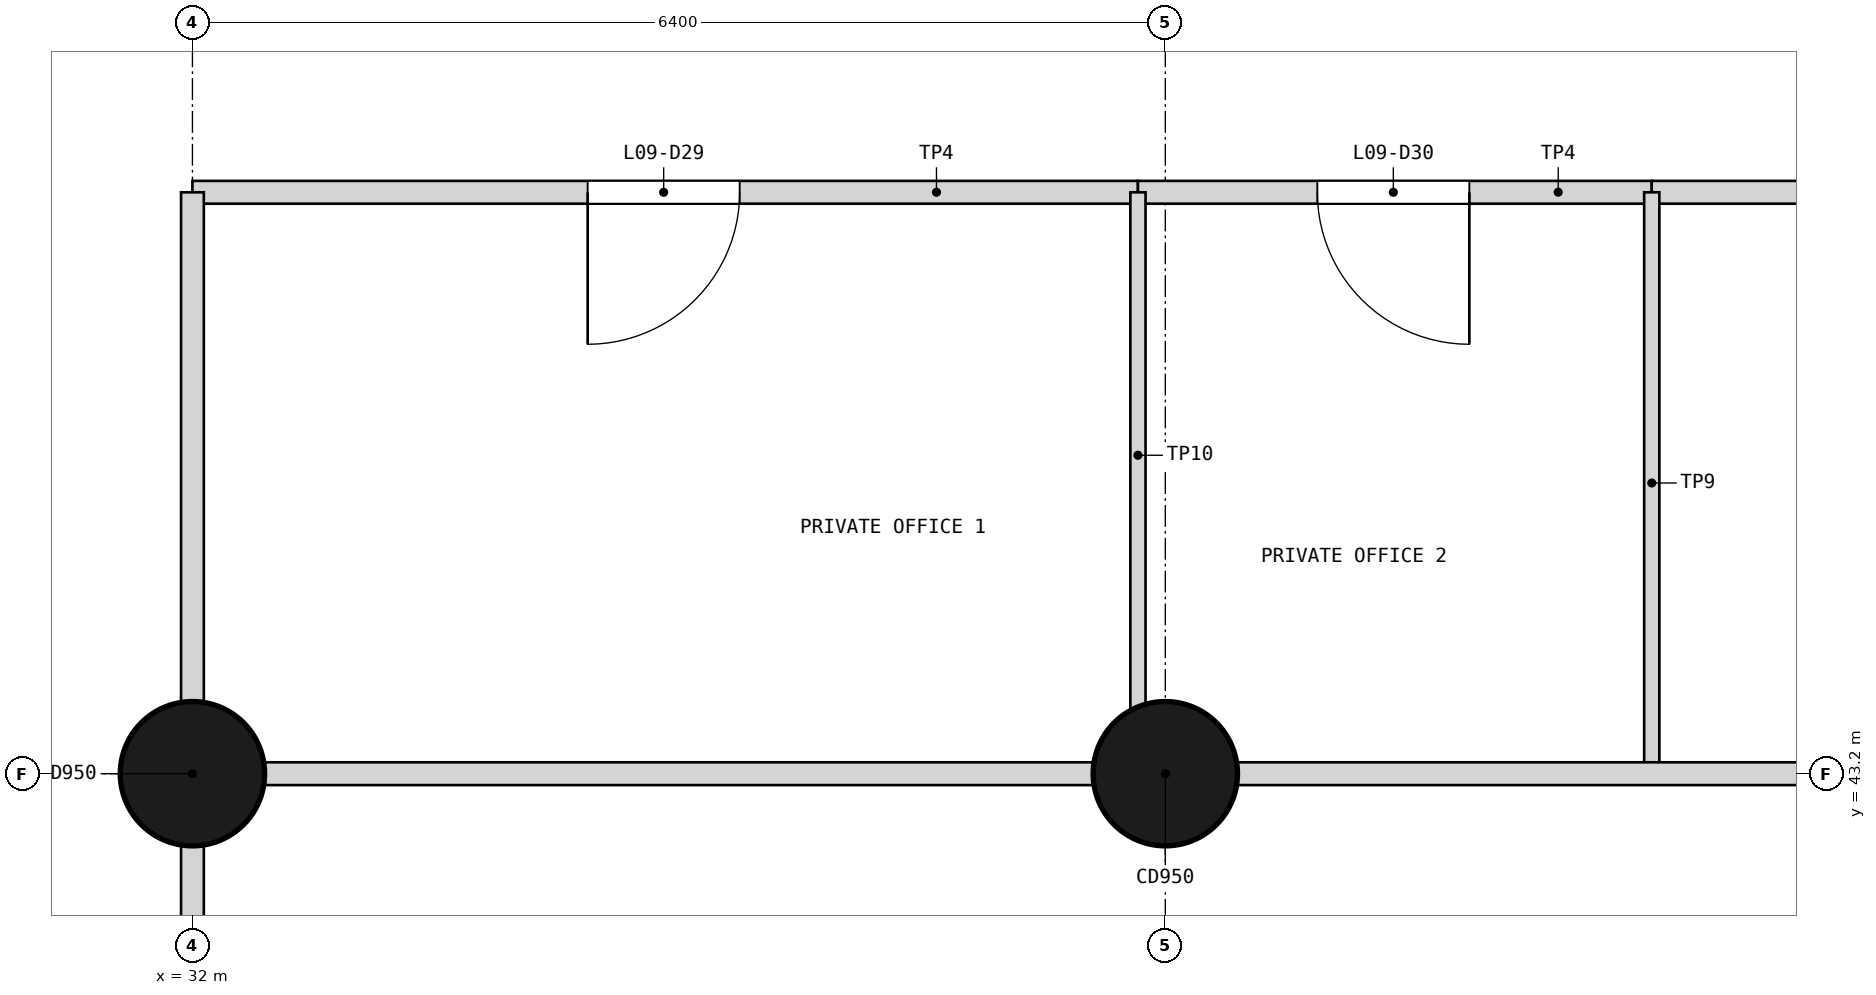
"""IFC4 building model, lengths in metres.
Left out: names, types, materials, properties, quantities, classifications, styles, units other than length and angle.
Written with IfcOpenShell. Run it as: python <this file> out.ifc"""

import sys

from ifc_helpers import new_model, si_unit, direction, frame, frame_2d, origin, origin_2d, place, context, subcontext, project, spatial, rectangle, circle, extrude, element, fill, save


model = new_model("IFC4")
c1 = context("Model", 3, precision=1e-05, world=origin(), true_north=direction((0.0, 1.0)))
c2 = subcontext(c1, "Body", "Model", "MODEL_VIEW")
j1 = project(units=[si_unit("LENGTHUNIT", "METRE"), si_unit("PLANEANGLEUNIT", "RADIAN")], contexts=[c1])
p1 = place(None, origin())
s1 = spatial("IfcSite", under=j1, at=p1, CompositionType="ELEMENT")
p2 = place(p1, origin())
s2 = spatial("IfcBuilding", under=s1, at=p2, CompositionType="ELEMENT")
p3 = place(p2, frame((0.0, 0.0, 36.6)))
s3 = spatial("IfcBuildingStorey", under=s2, at=p3, CompositionType="ELEMENT", Elevation=36.6)
for number, where, z_axis, x_axis in (
    (1, (32.0, 43.2, 0.0), (0.0, 0.0, 1.0), (1.0, 0.0, 0.0)),
    (2, (38.4, 43.2, 0.0), (0.0, 0.0, 1.0), (1.0, 0.0, 0.0)),
):
    element("IfcColumn", number, at=place(p3, frame(where, z_axis=z_axis, x_axis=x_axis)), inside=s3, PredefinedType="COLUMN", context=c2, shape_type="SweptSolid", body=[
        extrude(circle(Radius=0.475, at=origin_2d()), origin(), (0.0, 0.0, 1.0), 3.9),
    ])
p4 = place(p3, frame((32.0, 47.025, 0.0), z_axis=(0.0, 0.0, 1.0), x_axis=(1.0, 0.0, 0.0)))
e3 = element("IfcWall", 3, at=p4, inside=s3, PredefinedType="PARTITIONING", context=c2, shape_type="SweptSolid", body=[
    extrude(rectangle(XDim=6.22, YDim=0.15, at=frame_2d((3.11, 0.0))), origin(), (0.0, 0.0, 1.0), 3.68),
])
p5 = place(p4, frame((2.6, 0.0, 0.0)))
e4 = element("IfcOpeningElement", 4, at=p5, cuts=e3, PredefinedType="OPENING", context=c2, shape_type="SweptSolid", body=[
    extrude(rectangle(XDim=1.0, YDim=2.1, at=frame_2d((0.5, 1.05))), frame((0.0, 0.085, 0.0), z_axis=(0.0, -1.0, 0.0), x_axis=(1.0, 0.0, 0.0)), (0.0, 0.0, 1.0), 0.17),
])
p6 = place(p3, frame((38.22, 47.025, 0.0), z_axis=(0.0, 0.0, 1.0), x_axis=(1.0, 0.0, 0.0)))
e5 = element("IfcWall", 5, at=p6, inside=s3, PredefinedType="PARTITIONING", context=c2, shape_type="SweptSolid", body=[
    extrude(rectangle(XDim=3.38, YDim=0.15, at=frame_2d((1.69, 0.0))), origin(), (0.0, 0.0, 1.0), 3.68),
])
p7 = place(p6, frame((1.18, 0.0, 0.0)))
e6 = element("IfcOpeningElement", 6, at=p7, cuts=e5, PredefinedType="OPENING", context=c2, shape_type="SweptSolid", body=[
    extrude(rectangle(XDim=1.0, YDim=2.1, at=frame_2d((0.5, 1.05))), frame((0.0, 0.085, 0.0), z_axis=(0.0, -1.0, 0.0), x_axis=(1.0, 0.0, 0.0)), (0.0, 0.0, 1.0), 0.17),
])
p8 = place(p3, frame((41.6, 47.025, 0.0), z_axis=(0.0, 0.0, 1.0), x_axis=(1.0, 0.0, 0.0)))
e7 = element("IfcWall", 7, at=p8, inside=s3, PredefinedType="PARTITIONING", context=c2, shape_type="SweptSolid", body=[
    extrude(rectangle(XDim=6.4, YDim=0.15, at=frame_2d((3.2, 0.0))), origin(), (0.0, 0.0, 1.0), 3.68),
])
p9 = place(p8, frame((2.3, 0.0, 0.0)))
e8 = element("IfcOpeningElement", 8, at=p9, cuts=e7, PredefinedType="OPENING", context=c2, shape_type="SweptSolid", body=[
    extrude(rectangle(XDim=1.8, YDim=2.1, at=frame_2d((0.9, 1.05))), frame((0.0, 0.085, 0.0), z_axis=(0.0, -1.0, 0.0), x_axis=(1.0, 0.0, 0.0)), (0.0, 0.0, 1.0), 0.17),
])
p10 = place(p3, frame((38.22, 43.62, 0.0), z_axis=(0.0, 0.0, 1.0), x_axis=(0.0, 1.0, 0.0)))
e9 = element("IfcWall", 9, at=p10, inside=s3, PredefinedType="PARTITIONING", context=c2, shape_type="SweptSolid", body=[
    extrude(rectangle(XDim=3.405, YDim=0.1, at=frame_2d((1.703, 0.0))), origin(), (0.0, 0.0, 1.0), 2.78),
])
p11 = place(p3, frame((41.6, 43.2, 0.0), z_axis=(0.0, 0.0, 1.0), x_axis=(0.0, 1.0, 0.0)))
e10 = element("IfcWall", 10, at=p11, inside=s3, PredefinedType="PARTITIONING", context=c2, shape_type="SweptSolid", body=[
    extrude(rectangle(XDim=3.825, YDim=0.1, at=frame_2d((1.913, 0.0))), origin(), (0.0, 0.0, 1.0), 3.08),
])
p12 = place(p3, frame((32.0, 33.6, 0.0), z_axis=(0.0, 0.0, 1.0), x_axis=(0.0, 1.0, 0.0)))
e11 = element("IfcWall", 11, at=p12, inside=s3, PredefinedType="PARTITIONING", context=c2, shape_type="SweptSolid", body=[
    extrude(rectangle(XDim=13.425, YDim=0.15, at=frame_2d((6.712, 0.0))), origin(), (0.0, 0.0, 1.0), 2.78),
])
p13 = place(p3, frame((32.0, 43.2, 0.0), z_axis=(0.0, 0.0, 1.0), x_axis=(1.0, 0.0, 0.0)))
e12 = element("IfcWall", 12, at=p13, inside=s3, PredefinedType="PARTITIONING", context=c2, shape_type="SweptSolid", body=[
    extrude(rectangle(XDim=25.6, YDim=0.15, at=frame_2d((12.8, 0.0))), origin(), (0.0, 0.0, 1.0), 2.88),
])
p14 = place(p5, frame((1.0, 0.0, 0.0), z_axis=(0.0, 0.0, 1.0), x_axis=(-1.0, 0.0, 0.0)))
e13 = element("IfcDoor", 13, at=p14, inside=s3, OperationType="SINGLE_SWING_RIGHT", PredefinedType="DOOR", context=c2, shape_type="SweptSolid", body=[
    extrude(rectangle(XDim=1.0, YDim=2.1, at=frame_2d((0.5, 1.05))), frame((0.0, 0.025, 0.0), z_axis=(0.0, -1.0, 0.0), x_axis=(1.0, 0.0, 0.0)), (0.0, 0.0, 1.0), 0.05),
])
fill(e4, e13)
p15 = place(p7, frame((1.0, 0.0, 0.0), z_axis=(0.0, 0.0, 1.0), x_axis=(-1.0, 0.0, 0.0)))
e14 = element("IfcDoor", 14, at=p15, inside=s3, OperationType="SINGLE_SWING_LEFT", PredefinedType="DOOR", context=c2, shape_type="SweptSolid", body=[
    extrude(rectangle(XDim=1.0, YDim=2.1, at=frame_2d((0.5, 1.05))), frame((0.0, 0.025, 0.0), z_axis=(0.0, -1.0, 0.0), x_axis=(1.0, 0.0, 0.0)), (0.0, 0.0, 1.0), 0.05),
])
fill(e6, e14)
save(model, sys.argv[1])
